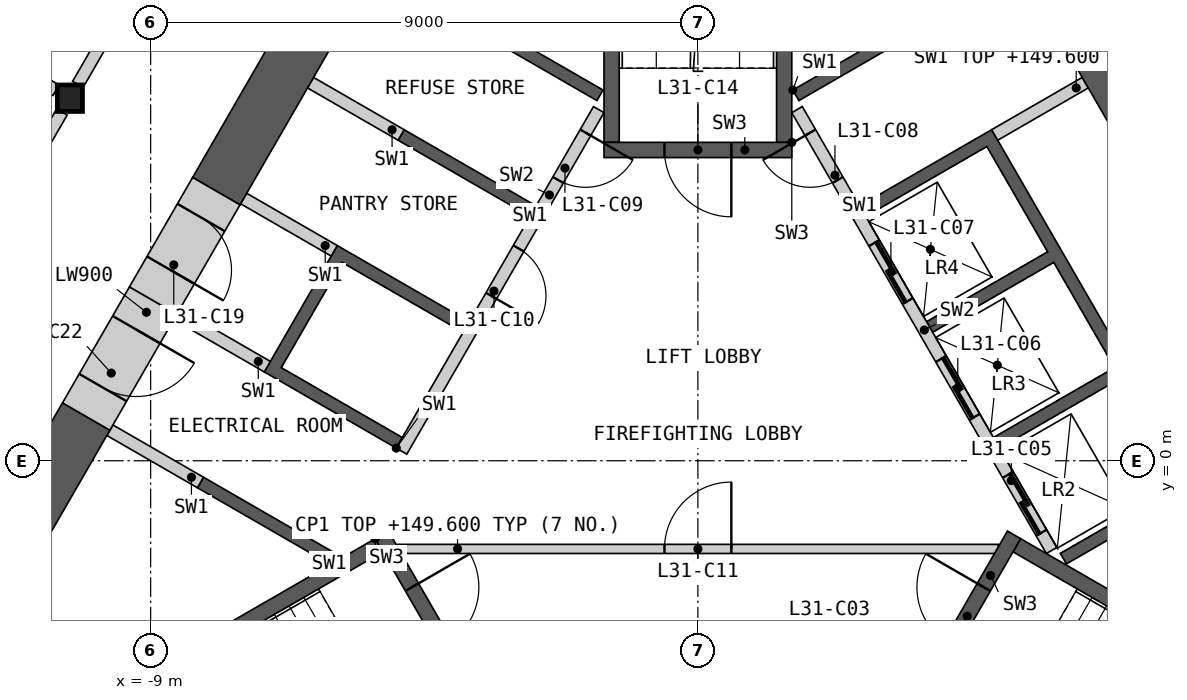
"""IFC4 building model, lengths in metres.
Left out: names, types, materials, properties, quantities, classifications, styles, units other than length and angle.
Written with IfcOpenShell. Run it as: python <this file> out.ifc"""

import sys

from ifc_helpers import new_model, si_unit, direction, frame, frame_2d, origin, origin_2d, place, context, subcontext, project, spatial, polyline, rectangle, i_section, outline, extrude, element, fill, save


model = new_model("IFC4")
c1 = context("Model", 3, precision=1e-05, world=origin(), true_north=direction((0.0, 1.0)))
c2 = subcontext(c1, "Body", "Model", "MODEL_VIEW")
j1 = project(units=[si_unit("LENGTHUNIT", "METRE"), si_unit("PLANEANGLEUNIT", "RADIAN")], contexts=[c1])
p1 = place(None, origin())
s1 = spatial("IfcSite", under=j1, at=p1, CompositionType="ELEMENT")
p2 = place(p1, origin())
s2 = spatial("IfcBuilding", under=s1, at=p2, CompositionType="ELEMENT")
p3 = place(p2, frame((0.0, 0.0, 145.8)))
s3 = spatial("IfcBuildingStorey", under=s2, at=p3, CompositionType="ELEMENT", Elevation=145.8)
p4 = place(p3, frame((-10.328, 5.963, 0.0), z_axis=(0.0, 0.0, 1.0), x_axis=(1.0, 0.0, 0.0)))
e1 = element("IfcColumn", 1, at=p4, inside=s3, PredefinedType="COLUMN", context=c2, shape_type="SweptSolid", body=[
    extrude(i_section(OverallWidth=0.412, OverallDepth=0.435, WebThickness=0.036, FlangeThickness=0.057, at=origin_2d()), origin(), (0.0, 0.0, 1.0), 4.2),
])
p5 = place(p3, origin())
e2 = element("IfcWall", 2, at=p5, inside=s3, PredefinedType="SHEAR", context=c2, shape_type="SweptSolid", body=[
    extrude(outline(polyline([(1.561, 6.097), (3.731, 7.35), (3.831, 7.177), (1.66, 5.924), (1.561, 6.097)])), origin(), (0.0, 0.0, 1.0), 3.8),
])
p6 = place(p3, origin())
e3 = element("IfcWall", 3, at=p6, inside=s3, PredefinedType="SHEAR", context=c2, shape_type="SweptSolid", body=[
    extrude(outline(polyline([(2.66, 4.192), (4.831, 5.445), (8.231, -0.444), (6.061, -1.697), (5.96, -1.524), (7.952, -0.374), (6.952, 1.358), (4.96, 0.208), (4.861, 0.381), (6.852, 1.531), (5.852, 3.263), (3.861, 2.113), (3.76, 2.287), (5.752, 3.437), (4.752, 5.169), (2.76, 4.019), (2.66, 4.192)])), origin(), (0.0, 0.0, 1.0), 3.8),
])
p7 = place(p3, frame((5.817, -1.476, 0.0), z_axis=(0.0, 0.0, 1.0), x_axis=(-0.500002616675, 0.866023893041, 0.0)))
e4 = element("IfcWall", 4, at=p7, inside=s3, PredefinedType="SOLIDWALL", context=c2, shape_type="SweptSolid", body=[
    extrude(rectangle(XDim=8.373, YDim=0.2, at=frame_2d((4.187, 0.0))), origin(), (0.0, 0.0, 1.0), 3.8),
])
p8 = place(p7, frame((0.337, 0.0, 0.0)))
e5 = element("IfcOpeningElement", 5, at=p8, cuts=e4, PredefinedType="OPENING", context=c2, shape_type="SweptSolid", body=[
    extrude(rectangle(XDim=1.1, YDim=2.1, at=frame_2d((0.55, 1.05))), frame((0.0, 0.11, 0.0), z_axis=(0.0, -1.0, 0.0), x_axis=(1.0, 0.0, 0.0)), (0.0, 0.0, 1.0), 0.22),
])
p9 = place(p7, frame((2.537, 0.0, 0.0)))
e6 = element("IfcOpeningElement", 6, at=p9, cuts=e4, PredefinedType="OPENING", context=c2, shape_type="SweptSolid", body=[
    extrude(rectangle(XDim=1.1, YDim=2.1, at=frame_2d((0.55, 1.05))), frame((0.0, 0.11, 0.0), z_axis=(0.0, -1.0, 0.0), x_axis=(1.0, 0.0, 0.0)), (0.0, 0.0, 1.0), 0.22),
])
p10 = place(p7, frame((4.737, 0.0, 0.0)))
e7 = element("IfcOpeningElement", 7, at=p10, cuts=e4, PredefinedType="OPENING", context=c2, shape_type="SweptSolid", body=[
    extrude(rectangle(XDim=1.1, YDim=2.1, at=frame_2d((0.55, 1.05))), frame((0.0, 0.11, 0.0), z_axis=(0.0, -1.0, 0.0), x_axis=(1.0, 0.0, 0.0)), (0.0, 0.0, 1.0), 0.22),
])
p11 = place(p7, frame((7.037, 0.0, 0.0)))
e8 = element("IfcOpeningElement", 8, at=p11, cuts=e4, PredefinedType="OPENING", context=c2, shape_type="SweptSolid", body=[
    extrude(rectangle(XDim=0.9, YDim=2.1, at=frame_2d((0.45, 1.05))), frame((0.0, 0.11, 0.0), z_axis=(0.0, -1.0, 0.0), x_axis=(1.0, 0.0, 0.0)), (0.0, 0.0, 1.0), 0.22),
])
p12 = place(p3, frame((4.881, 5.358, 0.0), z_axis=(0.0, 0.0, 1.0), x_axis=(0.866024871741, 0.500000921525, 0.0)))
e9 = element("IfcWall", 9, at=p12, inside=s3, PredefinedType="SHEAR", context=c2, shape_type="SweptSolid", body=[
    extrude(rectangle(XDim=1.72, YDim=0.2, at=frame_2d((0.86, 0.0))), origin(), (0.0, 0.0, 1.0), 3.8),
])
p13 = place(p3, origin())
e10 = element("IfcWall", 10, at=p13, inside=s3, PredefinedType="SHEAR", context=c2, shape_type="SweptSolid", body=[
    extrude(outline(polyline([(-6.061, -1.697), (-8.231, -0.444), (-8.131, -0.271), (-5.96, -1.524), (-6.061, -1.697)])), origin(), (0.0, 0.0, 1.0), 3.8),
])
p14 = place(p3, origin())
e11 = element("IfcWall", 11, at=p14, inside=s3, PredefinedType="SHEAR", context=c2, shape_type="SweptSolid", body=[
    extrude(outline(polyline([(-4.96, 0.208), (-7.131, 1.461), (-5.931, 3.54), (-3.76, 2.287), (-3.861, 2.113), (-5.852, 3.263), (-6.852, 1.531), (-4.861, 0.381), (-4.96, 0.208)])), origin(), (0.0, 0.0, 1.0), 3.8),
])
p15 = place(p3, origin())
e12 = element("IfcWall", 12, at=p15, inside=s3, PredefinedType="SHEAR", context=c2, shape_type="SweptSolid", body=[
    extrude(outline(polyline([(-2.76, 4.019), (-4.931, 5.272), (-4.831, 5.445), (-2.66, 4.192), (-2.76, 4.019)])), origin(), (0.0, 0.0, 1.0), 3.8),
])
p16 = place(p3, origin())
e13 = element("IfcWall", 13, at=p16, inside=s3, PredefinedType="SHEAR", context=c2, shape_type="SweptSolid", body=[
    extrude(outline(polyline([(-3.731, 7.35), (-1.561, 6.097), (-1.66, 5.924), (-3.831, 7.177), (-3.731, 7.35)])), origin(), (0.0, 0.0, 1.0), 3.8),
])
p17 = place(p3, frame((-1.631, 5.776, 0.0), z_axis=(0.0, 0.0, 1.0), x_axis=(-0.499992876559, -0.866029516466, 0.0)))
e14 = element("IfcWall", 14, at=p17, inside=s3, PredefinedType="SOLIDWALL", context=c2, shape_type="SweptSolid", body=[
    extrude(rectangle(XDim=6.486, YDim=0.2, at=frame_2d((3.243, 0.0))), origin(), (0.0, 0.0, 1.0), 3.8),
])
p18 = place(p17, frame((0.437, 0.0, 0.0)))
e15 = element("IfcOpeningElement", 15, at=p18, cuts=e14, PredefinedType="OPENING", context=c2, shape_type="SweptSolid", body=[
    extrude(rectangle(XDim=0.9, YDim=2.1, at=frame_2d((0.45, 1.05))), frame((0.0, 0.11, 0.0), z_axis=(0.0, -1.0, 0.0), x_axis=(1.0, 0.0, 0.0)), (0.0, 0.0, 1.0), 0.22),
])
p19 = place(p17, frame((2.637, 0.0, 0.0)))
e16 = element("IfcOpeningElement", 16, at=p19, cuts=e14, PredefinedType="OPENING", context=c2, shape_type="SweptSolid", body=[
    extrude(rectangle(XDim=0.9, YDim=2.1, at=frame_2d((0.45, 1.05))), frame((0.0, 0.11, 0.0), z_axis=(0.0, -1.0, 0.0), x_axis=(1.0, 0.0, 0.0)), (0.0, 0.0, 1.0), 0.22),
])
p20 = place(p3, frame((-4.881, 5.358, 0.0), z_axis=(0.0, 0.0, 1.0), x_axis=(-0.866024871741, 0.500000921525, 0.0)))
e17 = element("IfcWall", 17, at=p20, inside=s3, PredefinedType="SHEAR", context=c2, shape_type="SweptSolid", body=[
    extrude(rectangle(XDim=1.72, YDim=0.2, at=frame_2d((0.86, 0.0))), origin(), (0.0, 0.0, 1.0), 3.8),
])
p21 = place(p3, frame((-5.981, 3.453, 0.0), z_axis=(0.0, 0.0, 1.0), x_axis=(-0.866060346521, 0.499939472521, 0.0)))
e18 = element("IfcWall", 18, at=p21, inside=s3, PredefinedType="SHEAR", context=c2, shape_type="SweptSolid", body=[
    extrude(rectangle(XDim=1.72, YDim=0.2, at=frame_2d((0.86, 0.0))), origin(), (0.0, 0.0, 1.0), 3.8),
])
for number, where, z_axis, x_axis in (
    (19, (-7.081, 1.548, 0.0), (0.0, 0.0, 1.0), (-0.866, 0.5, 0.0)),
    (20, (-8.181, -0.357, 0.0), (0.0, 0.0, 1.0), (-0.866, 0.5, 0.0)),
):
    element("IfcWall", number, at=place(p3, frame(where, z_axis=z_axis, x_axis=x_axis)), inside=s3, PredefinedType="SHEAR", context=c2, shape_type="SweptSolid", body=[
        extrude(rectangle(XDim=1.72, YDim=0.2, at=frame_2d((0.86, 0.0))), origin(), (0.0, 0.0, 1.0), 3.8),
    ])
p22 = place(p3, frame((-4.941, -1.45, 0.0), z_axis=(0.0, 0.0, 1.0), x_axis=(1.0, 0.0, 0.0)))
e21 = element("IfcWall", 21, at=p22, inside=s3, PredefinedType="PARTITIONING", context=c2, shape_type="SweptSolid", body=[
    extrude(rectangle(XDim=9.882, YDim=0.15, at=frame_2d((4.941, 0.0))), origin(), (0.0, 0.0, 1.0), 3.8),
])
p23 = place(p22, frame((4.391, 0.0, 0.0)))
e22 = element("IfcOpeningElement", 22, at=p23, cuts=e21, PredefinedType="OPENING", context=c2, shape_type="SweptSolid", body=[
    extrude(rectangle(XDim=1.1, YDim=2.1, at=frame_2d((0.55, 1.05))), frame((0.0, 0.085, 0.0), z_axis=(0.0, -1.0, 0.0), x_axis=(1.0, 0.0, 0.0)), (0.0, 0.0, 1.0), 0.17),
])
p24 = place(p3, origin())
e23 = element("IfcWall", 23, at=p24, inside=s3, PredefinedType="SHEAR", context=c2, shape_type="SweptSolid", body=[
    extrude(outline(polyline([(-5.307, -1.281), (-10.374, -4.206), (-10.032, -4.298), (-5.182, -1.498), (-5.307, -1.281)])), origin(), (0.0, 0.0, 1.0), 3.8),
])
p25 = place(p3, frame((-5.199, -1.219, 0.0), z_axis=(0.0, 0.0, 1.0), x_axis=(0.499982516597, -0.866035497597, 0.0)))
e24 = element("IfcWall", 24, at=p25, inside=s3, PredefinedType="SHEAR", context=c2, shape_type="SweptSolid", body=[
    extrude(rectangle(XDim=3.088, YDim=0.25, at=frame_2d((1.544, 0.0))), origin(), (0.0, 0.0, 1.0), 3.8),
])
p26 = place(p25, frame((0.994, 0.0, 0.0)))
e25 = element("IfcOpeningElement", 25, at=p26, cuts=e24, PredefinedType="OPENING", context=c2, shape_type="SweptSolid", body=[
    extrude(rectangle(XDim=1.1, YDim=2.1, at=frame_2d((0.55, 1.05))), frame((0.0, 0.135, 0.0), z_axis=(0.0, -1.0, 0.0), x_axis=(1.0, 0.0, 0.0)), (0.0, 0.0, 1.0), 0.27),
])
p27 = place(p3, origin())
e26 = element("IfcWall", 26, at=p27, inside=s3, PredefinedType="SHEAR", context=c2, shape_type="SweptSolid", body=[
    extrude(outline(polyline([(10.032, -4.298), (10.374, -4.206), (5.307, -1.281), (5.182, -1.498), (10.032, -4.298)])), origin(), (0.0, 0.0, 1.0), 3.8),
])
p28 = place(p3, frame((3.655, -3.893, 0.0), z_axis=(0.0, 0.0, 1.0), x_axis=(0.499982516597, 0.866035497597, 0.0)))
e27 = element("IfcWall", 27, at=p28, inside=s3, PredefinedType="SHEAR", context=c2, shape_type="SweptSolid", body=[
    extrude(rectangle(XDim=3.088, YDim=0.25, at=frame_2d((1.544, 0.0))), origin(), (0.0, 0.0, 1.0), 3.8),
])
p29 = place(p28, frame((0.994, 0.0, 0.0)))
e28 = element("IfcOpeningElement", 28, at=p29, cuts=e27, PredefinedType="OPENING", context=c2, shape_type="SweptSolid", body=[
    extrude(rectangle(XDim=1.1, YDim=2.1, at=frame_2d((0.55, 1.05))), frame((0.0, 0.135, 0.0), z_axis=(0.0, -1.0, 0.0), x_axis=(1.0, 0.0, 0.0)), (0.0, 0.0, 1.0), 0.27),
])
p30 = place(p3, origin())
e29 = element("IfcWall", 29, at=p30, inside=s3, PredefinedType="SHEAR", context=c2, shape_type="SweptSolid", body=[
    extrude(outline(polyline([(1.544, 5.237), (1.544, 11.087), (1.294, 10.837), (1.294, 5.237), (1.544, 5.237)])), origin(), (0.0, 0.0, 1.0), 3.8),
])
p31 = place(p3, origin())
e30 = element("IfcWall", 30, at=p31, inside=s3, PredefinedType="SHEAR", context=c2, shape_type="SweptSolid", body=[
    extrude(outline(polyline([(-1.294, 10.837), (-1.544, 11.087), (-1.544, 5.237), (-1.294, 5.237), (-1.294, 10.837)])), origin(), (0.0, 0.0, 1.0), 3.8),
])
p32 = place(p3, frame((1.544, 5.112, 0.0), z_axis=(0.0, 0.0, 1.0), x_axis=(-1.0, 0.0, 0.0)))
e31 = element("IfcWall", 31, at=p32, inside=s3, PredefinedType="SHEAR", context=c2, shape_type="SweptSolid", body=[
    extrude(rectangle(XDim=3.088, YDim=0.25, at=frame_2d((1.544, 0.0))), origin(), (0.0, 0.0, 1.0), 3.8),
])
p33 = place(p32, frame((0.994, 0.0, 0.0)))
e32 = element("IfcOpeningElement", 32, at=p33, cuts=e31, PredefinedType="OPENING", context=c2, shape_type="SweptSolid", body=[
    extrude(rectangle(XDim=1.1, YDim=2.1, at=frame_2d((0.55, 1.05))), frame((0.0, 0.135, 0.0), z_axis=(0.0, -1.0, 0.0), x_axis=(1.0, 0.0, 0.0)), (0.0, 0.0, 1.0), 0.27),
])
p34 = place(p3, frame((8.372, 3.652, 0.0), z_axis=(0.0, 0.0, 1.0), x_axis=(-0.499997808738, 0.866026668906, 0.0)))
e33 = element("IfcWall", 33, at=p34, inside=s3, PredefinedType="SHEAR", context=c2, shape_type="SweptSolid", body=[
    extrude(rectangle(XDim=15.964, YDim=0.9, at=frame_2d((7.982, 0.0))), origin(), (0.0, 0.0, 1.0), 3.8),
])
p35 = place(p3, frame((-3.512, 12.069, 0.0), z_axis=(0.0, 0.0, 1.0), x_axis=(-0.500002126466, -0.866024176065, 0.0)))
e34 = element("IfcWall", 34, at=p35, inside=s3, PredefinedType="SHEAR", context=c2, shape_type="SweptSolid", body=[
    extrude(rectangle(XDim=8.816, YDim=0.9, at=frame_2d((4.408, 0.0))), origin(), (0.0, 0.0, 1.0), 3.8),
])
p36 = place(p3, frame((-10.06, 0.728, 0.0), z_axis=(0.0, 0.0, 1.0), x_axis=(-0.500021220092, -0.866013152012, 0.0)))
e35 = element("IfcWall", 35, at=p36, inside=s3, PredefinedType="SHEAR", context=c2, shape_type="SweptSolid", body=[
    extrude(rectangle(XDim=4.22, YDim=0.9, at=frame_2d((2.11, 0.0))), origin(), (0.0, 0.0, 1.0), 3.8),
])
p37 = place(p3, frame((-7.92, 4.434, 0.0), z_axis=(0.0, 0.0, 1.0), x_axis=(-0.499939227269, -0.866060488094, 0.0)))
e36 = element("IfcWall", 36, at=p37, inside=s3, PredefinedType="SHEAR", context=c2, shape_type="SweptSolid", body=[
    extrude(rectangle(XDim=2.08, YDim=0.9, at=frame_2d((1.04, 0.0))), origin(), (0.0, 0.0, 1.0), 3.8),
])
p38 = place(p37, frame((0.5, 0.0, 0.0)))
e37 = element("IfcOpeningElement", 37, at=p38, cuts=e36, PredefinedType="OPENING", context=c2, shape_type="SweptSolid", body=[
    extrude(rectangle(XDim=1.0, YDim=2.1, at=frame_2d((0.5, 1.05))), frame((0.0, 0.46, 0.0), z_axis=(0.0, -1.0, 0.0), x_axis=(1.0, 0.0, 0.0)), (0.0, 0.0, 1.0), 0.92),
])
p39 = place(p3, frame((-8.96, 2.633, 0.0), z_axis=(0.0, 0.0, 1.0), x_axis=(-0.50002983664, -0.866008176907, 0.0)))
e38 = element("IfcWall", 38, at=p39, inside=s3, PredefinedType="SHEAR", context=c2, shape_type="SweptSolid", body=[
    extrude(rectangle(XDim=2.2, YDim=0.9, at=frame_2d((1.1, 0.0))), origin(), (0.0, 0.0, 1.0), 3.8),
])
p40 = place(p39, frame((0.55, 0.0, 0.0)))
e39 = element("IfcOpeningElement", 39, at=p40, cuts=e38, PredefinedType="OPENING", context=c2, shape_type="SweptSolid", body=[
    extrude(rectangle(XDim=1.1, YDim=2.1, at=frame_2d((0.55, 1.05))), frame((0.0, 0.46, 0.0), z_axis=(0.0, -1.0, 0.0), x_axis=(1.0, 0.0, 0.0)), (0.0, 0.0, 1.0), 0.92),
])
p41 = place(p3, frame((-15.361, -2.754, 0.0), z_axis=(0.0, 0.0, 1.0), x_axis=(0.500004141693, 0.866023012564, 0.0)))
e40 = element("IfcWall", 40, at=p41, inside=s3, PredefinedType="PARTITIONING", context=c2, shape_type="SweptSolid", body=[
    extrude(rectangle(XDim=9.803, YDim=0.2, at=frame_2d((4.902, 0.0))), origin(), (0.0, 0.0, 1.0), 3.8),
])
p42 = place(p41, frame((4.052, 0.0, 0.0)))
e41 = element("IfcOpeningElement", 41, at=p42, cuts=e40, PredefinedType="OPENING", context=c2, shape_type="SweptSolid", body=[
    extrude(rectangle(XDim=1.8, YDim=2.1, at=frame_2d((0.9, 1.05))), frame((0.0, 0.11, 0.0), z_axis=(0.0, -1.0, 0.0), x_axis=(1.0, 0.0, 0.0)), (0.0, 0.0, 1.0), 0.22),
])
p43 = place(p3, frame((5.295, 14.68, 0.0), z_axis=(0.0, 0.0, 1.0), x_axis=(0.500012035596, -0.866018454918, 0.0)))
e42 = element("IfcWall", 42, at=p43, inside=s3, PredefinedType="PARTITIONING", context=c2, shape_type="SweptSolid", body=[
    extrude(rectangle(XDim=9.803, YDim=0.2, at=frame_2d((4.902, 0.0))), origin(), (0.0, 0.0, 1.0), 3.8),
])
p44 = place(p43, frame((6.853, 0.0, 0.0)))
e43 = element("IfcOpeningElement", 43, at=p44, cuts=e42, PredefinedType="OPENING", context=c2, shape_type="SweptSolid", body=[
    extrude(rectangle(XDim=1.0, YDim=2.1, at=frame_2d((0.5, 1.05))), frame((0.0, 0.11, 0.0), z_axis=(0.0, -1.0, 0.0), x_axis=(1.0, 0.0, 0.0)), (0.0, 0.0, 1.0), 0.22),
])
p45 = place(p3, frame((-10.197, 6.19, 0.0), z_axis=(0.0, 0.0, 1.0), x_axis=(0.500012035596, 0.866018454918, 0.0)))
e44 = element("IfcWall", 44, at=p45, inside=s3, PredefinedType="PARTITIONING", context=c2, shape_type="SweptSolid", body=[
    extrude(rectangle(XDim=9.803, YDim=0.2, at=frame_2d((4.902, 0.0))), origin(), (0.0, 0.0, 1.0), 3.8),
])
p46 = place(p45, frame((4.376, 0.0, 0.0)))
e45 = element("IfcOpeningElement", 45, at=p46, cuts=e44, PredefinedType="OPENING", context=c2, shape_type="SweptSolid", body=[
    extrude(rectangle(XDim=0.95, YDim=2.1, at=frame_2d((0.475, 1.05))), frame((0.0, 0.11, 0.0), z_axis=(0.0, -1.0, 0.0), x_axis=(1.0, 0.0, 0.0)), (0.0, 0.0, 1.0), 0.22),
])
p47 = place(p3, frame((-21.536, 12.434, 0.0), z_axis=(0.0, 0.0, 1.0), x_axis=(0.86602461759, -0.500001361726, 0.0)))
e46 = element("IfcWall", 46, at=p47, inside=s3, PredefinedType="PARTITIONING", context=c2, shape_type="SweptSolid", body=[
    extrude(rectangle(XDim=12.679, YDim=0.2, at=frame_2d((6.34, 0.0))), origin(), (0.0, 0.0, 1.0), 2.885),
])
p48 = place(p8, origin())
e47 = element("IfcDoor", 47, at=p48, inside=s3, OperationType="SLIDING_TO_LEFT", PredefinedType="DOOR", context=c2, shape_type="SweptSolid", body=[
    extrude(rectangle(XDim=1.1, YDim=2.1, at=frame_2d((0.55, 1.05))), frame((0.0, 0.025, 0.0), z_axis=(0.0, -1.0, 0.0), x_axis=(1.0, 0.0, 0.0)), (0.0, 0.0, 1.0), 0.05),
])
fill(e5, e47)
p49 = place(p9, origin())
e48 = element("IfcDoor", 48, at=p49, inside=s3, OperationType="SLIDING_TO_LEFT", PredefinedType="DOOR", context=c2, shape_type="SweptSolid", body=[
    extrude(rectangle(XDim=1.1, YDim=2.1, at=frame_2d((0.55, 1.05))), frame((0.0, 0.025, 0.0), z_axis=(0.0, -1.0, 0.0), x_axis=(1.0, 0.0, 0.0)), (0.0, 0.0, 1.0), 0.05),
])
fill(e6, e48)
p50 = place(p10, origin())
e49 = element("IfcDoor", 49, at=p50, inside=s3, OperationType="SLIDING_TO_LEFT", PredefinedType="DOOR", context=c2, shape_type="SweptSolid", body=[
    extrude(rectangle(XDim=1.1, YDim=2.1, at=frame_2d((0.55, 1.05))), frame((0.0, 0.025, 0.0), z_axis=(0.0, -1.0, 0.0), x_axis=(1.0, 0.0, 0.0)), (0.0, 0.0, 1.0), 0.05),
])
fill(e7, e49)
p51 = place(p11, origin())
e50 = element("IfcDoor", 50, at=p51, inside=s3, OperationType="SINGLE_SWING_RIGHT", PredefinedType="DOOR", context=c2, shape_type="SweptSolid", body=[
    extrude(rectangle(XDim=0.9, YDim=2.1, at=frame_2d((0.45, 1.05))), frame((0.0, 0.025, 0.0), z_axis=(0.0, -1.0, 0.0), x_axis=(1.0, 0.0, 0.0)), (0.0, 0.0, 1.0), 0.05),
])
fill(e8, e50)
p52 = place(p18, origin())
e51 = element("IfcDoor", 51, at=p52, inside=s3, OperationType="SINGLE_SWING_LEFT", PredefinedType="DOOR", context=c2, shape_type="SweptSolid", body=[
    extrude(rectangle(XDim=0.9, YDim=2.1, at=frame_2d((0.45, 1.05))), frame((0.0, 0.025, 0.0), z_axis=(0.0, -1.0, 0.0), x_axis=(1.0, 0.0, 0.0)), (0.0, 0.0, 1.0), 0.05),
])
fill(e15, e51)
p53 = place(p19, origin())
e52 = element("IfcDoor", 52, at=p53, inside=s3, OperationType="SINGLE_SWING_RIGHT", PredefinedType="DOOR", context=c2, shape_type="SweptSolid", body=[
    extrude(rectangle(XDim=0.9, YDim=2.1, at=frame_2d((0.45, 1.05))), frame((0.0, 0.025, 0.0), z_axis=(0.0, -1.0, 0.0), x_axis=(1.0, 0.0, 0.0)), (0.0, 0.0, 1.0), 0.05),
])
fill(e16, e52)
p54 = place(p23, origin())
e53 = element("IfcDoor", 53, at=p54, inside=s3, OperationType="SINGLE_SWING_RIGHT", PredefinedType="DOOR", context=c2, shape_type="SweptSolid", body=[
    extrude(rectangle(XDim=1.1, YDim=2.1, at=frame_2d((0.55, 1.05))), frame((0.0, 0.025, 0.0), z_axis=(0.0, -1.0, 0.0), x_axis=(1.0, 0.0, 0.0)), (0.0, 0.0, 1.0), 0.05),
])
fill(e22, e53)
p55 = place(p26, origin())
e54 = element("IfcDoor", 54, at=p55, inside=s3, OperationType="SINGLE_SWING_LEFT", PredefinedType="DOOR", context=c2, shape_type="SweptSolid", body=[
    extrude(rectangle(XDim=1.1, YDim=2.1, at=frame_2d((0.55, 1.05))), frame((0.0, 0.025, 0.0), z_axis=(0.0, -1.0, 0.0), x_axis=(1.0, 0.0, 0.0)), (0.0, 0.0, 1.0), 0.05),
])
fill(e25, e54)
p56 = place(p29, origin())
e55 = element("IfcDoor", 55, at=p56, inside=s3, OperationType="SINGLE_SWING_RIGHT", PredefinedType="DOOR", context=c2, shape_type="SweptSolid", body=[
    extrude(rectangle(XDim=1.1, YDim=2.1, at=frame_2d((0.55, 1.05))), frame((0.0, 0.025, 0.0), z_axis=(0.0, -1.0, 0.0), x_axis=(1.0, 0.0, 0.0)), (0.0, 0.0, 1.0), 0.05),
])
fill(e28, e55)
p57 = place(p33, origin())
e56 = element("IfcDoor", 56, at=p57, inside=s3, OperationType="SINGLE_SWING_LEFT", PredefinedType="DOOR", context=c2, shape_type="SweptSolid", body=[
    extrude(rectangle(XDim=1.1, YDim=2.1, at=frame_2d((0.55, 1.05))), frame((0.0, 0.025, 0.0), z_axis=(0.0, -1.0, 0.0), x_axis=(1.0, 0.0, 0.0)), (0.0, 0.0, 1.0), 0.05),
])
fill(e32, e56)
p58 = place(p38, origin())
e57 = element("IfcDoor", 57, at=p58, inside=s3, OperationType="SINGLE_SWING_RIGHT", PredefinedType="DOOR", context=c2, shape_type="SweptSolid", body=[
    extrude(rectangle(XDim=1.0, YDim=2.1, at=frame_2d((0.5, 1.05))), frame((0.0, 0.205, 0.0), z_axis=(0.0, -1.0, 0.0), x_axis=(1.0, 0.0, 0.0)), (0.0, 0.0, 1.0), 0.05),
])
fill(e37, e57)
p59 = place(p40, origin())
e58 = element("IfcDoor", 58, at=p59, inside=s3, OperationType="SINGLE_SWING_LEFT", PredefinedType="DOOR", context=c2, shape_type="SweptSolid", body=[
    extrude(rectangle(XDim=1.1, YDim=2.1, at=frame_2d((0.55, 1.05))), frame((0.0, 0.205, 0.0), z_axis=(0.0, -1.0, 0.0), x_axis=(1.0, 0.0, 0.0)), (0.0, 0.0, 1.0), 0.05),
])
fill(e39, e58)
save(model, sys.argv[1])
